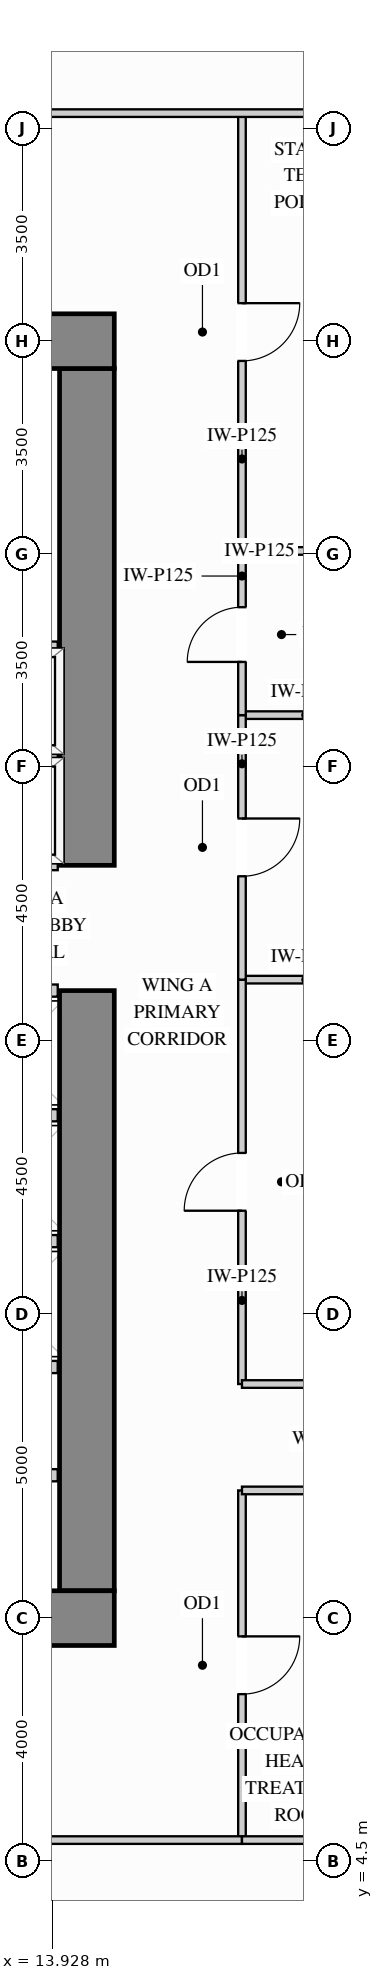
"""IFC4 building model, lengths in metres.
Left out: names, types, materials, properties, quantities, classifications, styles, units other than length and angle.
Written with IfcOpenShell. Run it as: python <this file> out.ifc"""

import sys

from ifc_helpers import new_model, si_unit, direction, frame, frame_2d, origin, place, context, subcontext, project, spatial, rectangle, extrude, source, transform, mapped, element, fill, save


model = new_model("IFC4")
c1 = context("Model", 3, precision=1e-05, world=origin(), true_north=direction((0.0, 1.0)))
c2 = subcontext(c1, "Body", "Model", "MODEL_VIEW")
j1 = project(units=[si_unit("LENGTHUNIT", "METRE"), si_unit("PLANEANGLEUNIT", "RADIAN")], contexts=[c1])
p1 = place(None, origin())
s1 = spatial("IfcSite", under=j1, at=p1, CompositionType="ELEMENT")
p2 = place(p1, origin())
s2 = spatial("IfcBuilding", under=s1, at=p2, CompositionType="ELEMENT")
p3 = place(p2, frame((0.0, 0.0, 33.3)))
s3 = spatial("IfcBuildingStorey", under=s2, at=p3, CompositionType="ELEMENT", Elevation=33.3)
m1 = source(origin(), c2, "Body", "SweptSolid", [
    extrude(rectangle(XDim=9.87, YDim=0.9, at=frame_2d((4.935, 0.0))), origin(), (0.0, 0.0, 1.0), 3.38),
])
p4 = place(p3, frame((14.5, 8.95, 0.0), z_axis=(0.0, 0.0, 1.0), x_axis=(0.0, 1.0, 0.0)))
e1 = element("IfcWall", 1, at=p4, inside=s3, PredefinedType="SHEAR", context=c2, shape_type="MappedRepresentation", body=[
    mapped(m1, transform((0.0, 0.0, 0.0), x_axis=(1.0, 0.0, 0.0), y_axis=(0.0, 1.0, 0.0), z_axis=(0.0, 0.0, 1.0))),
])
m2 = source(origin(), c2, "Body", "SweptSolid", [
    extrude(rectangle(XDim=8.17, YDim=0.9, at=frame_2d((4.085, 0.0))), origin(), (0.0, 0.0, 1.0), 3.38),
])
p5 = place(p3, frame((14.5, 20.88, 0.0), z_axis=(0.0, 0.0, 1.0), x_axis=(0.0, 1.0, 0.0)))
e2 = element("IfcWall", 2, at=p5, inside=s3, PredefinedType="SHEAR", context=c2, shape_type="MappedRepresentation", body=[
    mapped(m2, transform((0.0, 0.0, 0.0), x_axis=(1.0, 0.0, 0.0), y_axis=(0.0, 1.0, 0.0), z_axis=(0.0, 0.0, 1.0))),
])
m3 = source(origin(), c2, "Body", "SweptSolid", [
    extrude(rectangle(XDim=10.9, YDim=0.9, at=frame_2d((5.45, 0.0))), origin(), (0.0, 0.0, 1.0), 3.38),
])
for number, where, z_axis, x_axis in (
    (3, (4.05, 29.5, 0.0), (0.0, 0.0, 1.0), (1.0, 0.0, 0.0)),
    (4, (4.05, 8.5, 0.0), (0.0, 0.0, 1.0), (1.0, 0.0, 0.0)),
):
    element("IfcWall", number, at=place(p3, frame(where, z_axis=z_axis, x_axis=x_axis)), inside=s3, PredefinedType="SHEAR", context=c2, shape_type="MappedRepresentation", body=[
        mapped(m3, transform((0.0, 0.0, 0.0), x_axis=(1.0, 0.0, 0.0), y_axis=(0.0, 1.0, 0.0), z_axis=(0.0, 0.0, 1.0))),
    ])
m4 = source(origin(), c2, "Body", "SweptSolid", [
    extrude(rectangle(XDim=2.1, YDim=0.125, at=frame_2d((1.05, 0.0))), origin(), (0.0, 0.0, 1.0), 3.365),
])
p6 = place(p3, frame((17.05, 19.0, 0.0), z_axis=(0.0, 0.0, 1.0), x_axis=(1.0, 0.0, 0.0)))
e5 = element("IfcWall", 5, at=p6, inside=s3, PredefinedType="PARTITIONING", context=c2, shape_type="MappedRepresentation", body=[
    mapped(m4, transform((0.0, 0.0, 0.0), x_axis=(1.0, 0.0, 0.0), y_axis=(0.0, 1.0, 0.0), z_axis=(0.0, 0.0, 1.0))),
])
m5 = source(origin(), c2, "Body", "SweptSolid", [
    extrude(rectangle(XDim=2.098, YDim=0.125, at=frame_2d((1.049, 0.0))), origin(), (0.0, 0.0, 1.0), 3.365),
])
for number, where, z_axis, x_axis in (
    (6, (17.05, 23.35, 0.0), (0.0, 0.0, 1.0), (1.0, 0.0, 0.0)),
    (7, (17.05, 26.05, 0.0), (0.0, 0.0, 1.0), (1.0, 0.0, 0.0)),
):
    element("IfcWall", number, at=place(p3, frame(where, z_axis=z_axis, x_axis=x_axis)), inside=s3, PredefinedType="PARTITIONING", context=c2, shape_type="MappedRepresentation", body=[
        mapped(m5, transform((0.0, 0.0, 0.0), x_axis=(1.0, 0.0, 0.0), y_axis=(0.0, 1.0, 0.0), z_axis=(0.0, 0.0, 1.0))),
    ])
p7 = place(p3, frame((17.05, 12.35, 0.0), z_axis=(0.0, 0.0, 1.0), x_axis=(0.0, 1.0, 0.0)))
e8 = element("IfcWall", 8, at=p7, inside=s3, PredefinedType="PARTITIONING", context=c2, shape_type="SweptSolid", body=[
    extrude(rectangle(XDim=6.65, YDim=0.125, at=frame_2d((3.325, 0.0))), origin(), (0.0, 0.0, 1.0), 3.365),
])
p8 = place(p7, frame((2.85, 0.0, 0.0)))
e9 = element("IfcOpeningElement", 9, at=p8, cuts=e8, PredefinedType="OPENING", context=c2, shape_type="SweptSolid", body=[
    extrude(rectangle(XDim=0.95, YDim=2.15, at=frame_2d((0.475, 1.075))), frame((0.0, 0.073, 0.0), z_axis=(0.0, -1.0, 0.0), x_axis=(1.0, 0.0, 0.0)), (0.0, 0.0, 1.0), 0.145),
])
p9 = place(p3, frame((17.05, 19.0, 0.0), z_axis=(0.0, 0.0, 1.0), x_axis=(0.0, 1.0, 0.0)))
e10 = element("IfcWall", 10, at=p9, inside=s3, PredefinedType="PARTITIONING", context=c2, shape_type="SweptSolid", body=[
    extrude(rectangle(XDim=4.35, YDim=0.125, at=frame_2d((2.175, 0.0))), origin(), (0.0, 0.0, 1.0), 3.365),
])
p10 = place(p9, frame((1.7, 0.0, 0.0)))
e11 = element("IfcOpeningElement", 11, at=p10, cuts=e10, PredefinedType="OPENING", context=c2, shape_type="SweptSolid", body=[
    extrude(rectangle(XDim=0.95, YDim=2.15, at=frame_2d((0.475, 1.075))), frame((0.0, 0.073, 0.0), z_axis=(0.0, -1.0, 0.0), x_axis=(1.0, 0.0, 0.0)), (0.0, 0.0, 1.0), 0.145),
])
p11 = place(p3, frame((17.05, 26.05, 0.0), z_axis=(0.0, 0.0, 1.0), x_axis=(0.0, 1.0, 0.0)))
e12 = element("IfcWall", 12, at=p11, inside=s3, PredefinedType="PARTITIONING", context=c2, shape_type="SweptSolid", body=[
    extrude(rectangle(XDim=7.2, YDim=0.125, at=frame_2d((3.6, 0.0))), origin(), (0.0, 0.0, 1.0), 3.365),
])
p12 = place(p11, frame((3.125, 0.0, 0.0)))
e13 = element("IfcOpeningElement", 13, at=p12, cuts=e12, PredefinedType="OPENING", context=c2, shape_type="SweptSolid", body=[
    extrude(rectangle(XDim=0.95, YDim=2.15, at=frame_2d((0.475, 1.075))), frame((0.0, 0.073, 0.0), z_axis=(0.0, -1.0, 0.0), x_axis=(1.0, 0.0, 0.0)), (0.0, 0.0, 1.0), 0.145),
])
p13 = place(p3, frame((17.05, 4.85, 0.0), z_axis=(0.0, 0.0, 1.0), x_axis=(0.0, 1.0, 0.0)))
e14 = element("IfcWall", 14, at=p13, inside=s3, PredefinedType="PARTITIONING", context=c2, shape_type="SweptSolid", body=[
    extrude(rectangle(XDim=5.75, YDim=0.125, at=frame_2d((2.875, 0.0))), origin(), (0.0, 0.0, 1.0), 3.365),
])
p14 = place(p13, frame((2.4, 0.0, 0.0)))
e15 = element("IfcOpeningElement", 15, at=p14, cuts=e14, PredefinedType="OPENING", context=c2, shape_type="SweptSolid", body=[
    extrude(rectangle(XDim=0.95, YDim=2.15, at=frame_2d((0.475, 1.075))), frame((0.0, 0.073, 0.0), z_axis=(0.0, -1.0, 0.0), x_axis=(1.0, 0.0, 0.0)), (0.0, 0.0, 1.0), 0.145),
])
p15 = place(p3, frame((17.05, 23.35, 0.0), z_axis=(0.0, 0.0, 1.0), x_axis=(0.0, 1.0, 0.0)))
e16 = element("IfcWall", 16, at=p15, inside=s3, PredefinedType="PARTITIONING", context=c2, shape_type="SweptSolid", body=[
    extrude(rectangle(XDim=2.7, YDim=0.125, at=frame_2d((1.35, 0.0))), origin(), (0.0, 0.0, 1.0), 3.365),
])
p16 = place(p15, frame((0.875, 0.0, 0.0)))
e17 = element("IfcOpeningElement", 17, at=p16, cuts=e16, PredefinedType="OPENING", context=c2, shape_type="SweptSolid", body=[
    extrude(rectangle(XDim=0.9, YDim=2.15, at=frame_2d((0.45, 1.075))), frame((0.0, 0.073, 0.0), z_axis=(0.0, -1.0, 0.0), x_axis=(1.0, 0.0, 0.0)), (0.0, 0.0, 1.0), 0.145),
])
m6 = source(origin(), c2, "Body", "SweptSolid", [
    extrude(rectangle(XDim=7.498, YDim=0.125, at=frame_2d((3.749, 0.0))), origin(), (0.0, 0.0, 1.0), 2.828),
])
p17 = place(p3, frame((11.65, 33.25, 0.0), z_axis=(0.0, 0.0, 1.0), x_axis=(1.0, 0.0, 0.0)))
e18 = element("IfcWall", 18, at=p17, inside=s3, PredefinedType="PARTITIONING", context=c2, shape_type="MappedRepresentation", body=[
    mapped(m6, transform((0.0, 0.0, 0.0), x_axis=(1.0, 0.0, 0.0), y_axis=(0.0, 1.0, 0.0), z_axis=(0.0, 0.0, 1.0))),
])
m7 = source(origin(), c2, "Body", "SweptSolid", [
    extrude(rectangle(XDim=2.45, YDim=0.125, at=frame_2d((1.225, 0.0))), origin(), (0.0, 0.0, 1.0), 3.365),
])
for number, where, z_axis, x_axis in (
    (19, (17.05, 12.35, 0.0), (0.0, 0.0, 1.0), (1.0, 0.0, 0.0)),
    (20, (17.05, 10.6, 0.0), (0.0, 0.0, 1.0), (1.0, 0.0, 0.0)),
):
    element("IfcWall", number, at=place(p3, frame(where, z_axis=z_axis, x_axis=x_axis)), inside=s3, PredefinedType="PARTITIONING", context=c2, shape_type="MappedRepresentation", body=[
        mapped(m7, transform((0.0, 0.0, 0.0), x_axis=(1.0, 0.0, 0.0), y_axis=(0.0, 1.0, 0.0), z_axis=(0.0, 0.0, 1.0))),
    ])
p18 = place(p3, frame((2.45, 4.85, 0.0), z_axis=(0.0, 0.0, 1.0), x_axis=(1.0, 0.0, 0.0)))
e21 = element("IfcWall", 21, at=p18, inside=s3, PredefinedType="PARTITIONING", context=c2, shape_type="SweptSolid", body=[
    extrude(rectangle(XDim=14.6, YDim=0.125, at=frame_2d((7.3, 0.0))), origin(), (0.0, 0.0, 1.0), 2.828),
])
p19 = place(p18, frame((6.825, 0.0, 0.0)))
e22 = element("IfcOpeningElement", 22, at=p19, cuts=e21, PredefinedType="OPENING", context=c2, shape_type="SweptSolid", body=[
    extrude(rectangle(XDim=0.95, YDim=2.15, at=frame_2d((0.475, 1.075))), frame((0.0, 0.073, 0.0), z_axis=(0.0, -1.0, 0.0), x_axis=(1.0, 0.0, 0.0)), (0.0, 0.0, 1.0), 0.145),
])
m8 = source(origin(), c2, "Body", "SweptSolid", [
    extrude(rectangle(XDim=2.098, YDim=0.125, at=frame_2d((1.049, 0.0))), origin(), (0.0, 0.0, 1.0), 2.828),
])
p20 = place(p3, frame((17.05, 4.85, 0.0), z_axis=(0.0, 0.0, 1.0), x_axis=(1.0, 0.0, 0.0)))
e23 = element("IfcWall", 23, at=p20, inside=s3, PredefinedType="PARTITIONING", context=c2, shape_type="MappedRepresentation", body=[
    mapped(m8, transform((0.0, 0.0, 0.0), x_axis=(1.0, 0.0, 0.0), y_axis=(0.0, 1.0, 0.0), z_axis=(0.0, 0.0, 1.0))),
])
m9 = source(origin(), c2, "Body", "SweptSolid", [
    extrude(rectangle(XDim=1.6, YDim=0.2, at=frame_2d((0.8, 0.0))), origin(), (0.0, 0.0, 1.0), 3.365),
])
p21 = place(p3, frame((12.42, 10.85, 0.0), z_axis=(0.0, 0.0, 1.0), x_axis=(1.0, 0.0, 0.0)))
e24 = element("IfcWall", 24, at=p21, inside=s3, PredefinedType="PARTITIONING", context=c2, shape_type="MappedRepresentation", body=[
    mapped(m9, transform((0.0, 0.0, 0.0), x_axis=(1.0, 0.0, 0.0), y_axis=(0.0, 1.0, 0.0), z_axis=(0.0, 0.0, 1.0))),
])
m10 = source(origin(), c2, "Body", "SweptSolid", [
    extrude(rectangle(XDim=2.19, YDim=0.2, at=frame_2d((1.095, 0.0))), origin(), (0.0, 0.0, 1.0), 3.365),
])
for number, where, z_axis, x_axis in (
    (25, (11.83, 22.66, 0.0), (0.0, 0.0, 1.0), (1.0, 0.0, 0.0)),
    (26, (11.83, 20.9, 0.0), (0.0, 0.0, 1.0), (1.0, 0.0, 0.0)),
    (27, (11.83, 24.46, 0.0), (0.0, 0.0, 1.0), (1.0, 0.0, 0.0)),
):
    element("IfcWall", number, at=place(p3, frame(where, z_axis=z_axis, x_axis=x_axis)), inside=s3, PredefinedType="PARTITIONING", context=c2, shape_type="MappedRepresentation", body=[
        mapped(m10, transform((0.0, 0.0, 0.0), x_axis=(1.0, 0.0, 0.0), y_axis=(0.0, 1.0, 0.0), z_axis=(0.0, 0.0, 1.0))),
    ])
m11 = source(origin(), c2, "Body", "SweptSolid", [
    extrude(rectangle(XDim=1.79, YDim=0.2, at=frame_2d((0.895, 0.0))), origin(), (0.0, 0.0, 1.0), 3.365),
])
for number, where, z_axis, x_axis in (
    (28, (12.23, 14.7, 0.0), (0.0, 0.0, 1.0), (1.0, 0.0, 0.0)),
    (29, (12.23, 12.63, 0.0), (0.0, 0.0, 1.0), (1.0, 0.0, 0.0)),
    (30, (12.23, 16.77, 0.0), (0.0, 0.0, 1.0), (1.0, 0.0, 0.0)),
    (31, (12.23, 18.82, 0.0), (0.0, 0.0, 1.0), (1.0, 0.0, 0.0)),
):
    element("IfcWall", number, at=place(p3, frame(where, z_axis=z_axis, x_axis=x_axis)), inside=s3, PredefinedType="PARTITIONING", context=c2, shape_type="MappedRepresentation", body=[
        mapped(m11, transform((0.0, 0.0, 0.0), x_axis=(1.0, 0.0, 0.0), y_axis=(0.0, 1.0, 0.0), z_axis=(0.0, 0.0, 1.0))),
    ])
m12 = source(origin(), c2, "Body", "SweptSolid", [
    extrude(rectangle(XDim=0.95, YDim=2.15, at=frame_2d((0.475, 1.075))), frame((0.0, 0.025, 0.0), z_axis=(0.0, -1.0, 0.0), x_axis=(1.0, 0.0, 0.0)), (0.0, 0.0, 1.0), 0.05),
])
p22 = place(p14, origin())
e32 = element("IfcDoor", 32, at=p22, inside=s3, OperationType="SINGLE_SWING_RIGHT", PredefinedType="DOOR", context=c2, shape_type="MappedRepresentation", body=[
    mapped(m12, transform((0.0, 0.0, 0.0), x_axis=(1.0, 0.0, 0.0), y_axis=(0.0, 1.0, 0.0), z_axis=(0.0, 0.0, 1.0))),
])
fill(e15, e32)
p23 = place(p8, origin())
e33 = element("IfcDoor", 33, at=p23, inside=s3, OperationType="SINGLE_SWING_LEFT", PredefinedType="DOOR", context=c2, shape_type="MappedRepresentation", body=[
    mapped(m12, transform((0.0, 0.0, 0.0), x_axis=(1.0, 0.0, 0.0), y_axis=(0.0, 1.0, 0.0), z_axis=(0.0, 0.0, 1.0))),
])
fill(e9, e33)
p24 = place(p10, origin())
e34 = element("IfcDoor", 34, at=p24, inside=s3, OperationType="SINGLE_SWING_RIGHT", PredefinedType="DOOR", context=c2, shape_type="MappedRepresentation", body=[
    mapped(m12, transform((0.0, 0.0, 0.0), x_axis=(1.0, 0.0, 0.0), y_axis=(0.0, 1.0, 0.0), z_axis=(0.0, 0.0, 1.0))),
])
fill(e11, e34)
p25 = place(p12, origin())
e35 = element("IfcDoor", 35, at=p25, inside=s3, OperationType="SINGLE_SWING_RIGHT", PredefinedType="DOOR", context=c2, shape_type="MappedRepresentation", body=[
    mapped(m12, transform((0.0, 0.0, 0.0), x_axis=(1.0, 0.0, 0.0), y_axis=(0.0, 1.0, 0.0), z_axis=(0.0, 0.0, 1.0))),
])
fill(e13, e35)
m13 = source(origin(), c2, "Body", "SweptSolid", [
    extrude(rectangle(XDim=0.9, YDim=2.15, at=frame_2d((0.45, 1.075))), frame((0.0, 0.025, 0.0), z_axis=(0.0, -1.0, 0.0), x_axis=(1.0, 0.0, 0.0)), (0.0, 0.0, 1.0), 0.05),
])
p26 = place(p16, origin())
e36 = element("IfcDoor", 36, at=p26, inside=s3, OperationType="SINGLE_SWING_LEFT", PredefinedType="DOOR", context=c2, shape_type="MappedRepresentation", body=[
    mapped(m13, transform((0.0, 0.0, 0.0), x_axis=(1.0, 0.0, 0.0), y_axis=(0.0, 1.0, 0.0), z_axis=(0.0, 0.0, 1.0))),
])
fill(e17, e36)
save(model, sys.argv[1])
